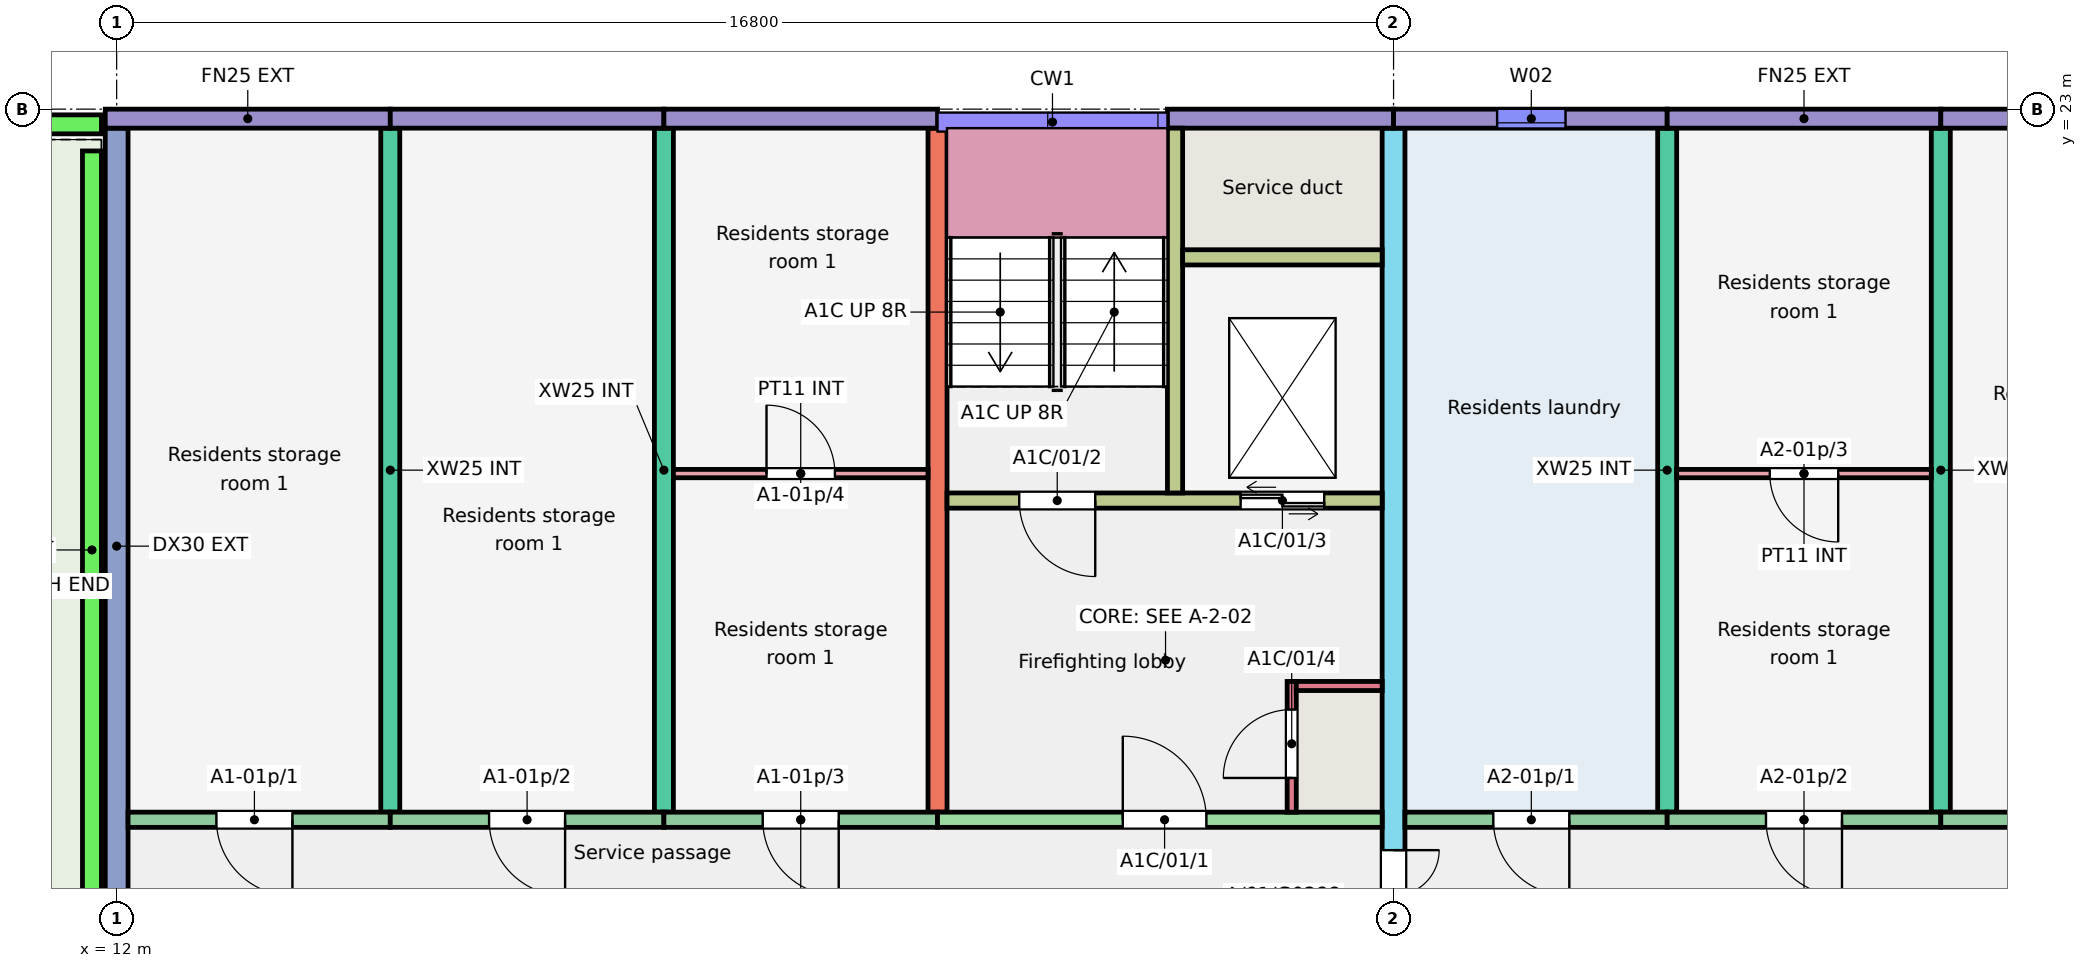
"""IFC4 building model, lengths in metres.
Left out: names, types, materials, properties, quantities, classifications, styles, units other than length and angle.
Written with IfcOpenShell. Run it as: python <this file> out.ifc"""

import sys

from ifc_helpers import new_model, si_unit, direction, frame, frame_2d, origin, place, context, subcontext, project, spatial, rectangle, extrude, element, fill, save


model = new_model("IFC4")
c1 = context("Model", 3, precision=1e-05, world=origin(), true_north=direction((0.0, 1.0)))
c2 = subcontext(c1, "Body", "Model", "MODEL_VIEW")
j1 = project(units=[si_unit("LENGTHUNIT", "METRE"), si_unit("PLANEANGLEUNIT", "RADIAN")], contexts=[c1])
p1 = place(None, origin())
s1 = spatial("IfcSite", under=j1, at=p1, CompositionType="ELEMENT")
p2 = place(p1, origin())
s2 = spatial("IfcBuilding", under=s1, at=p2, CompositionType="ELEMENT")
p3 = place(p2, frame((0.0, 0.0, 3.0)))
s3 = spatial("IfcBuildingStorey", under=s2, at=p3, CompositionType="ELEMENT", Elevation=3.0)
p4 = place(p3, frame((12.0, 11.75, 0.0), z_axis=(0.0, 0.0, 1.0), x_axis=(0.0, 1.0, 0.0)))
e1 = element("IfcWall", 1, at=p4, inside=s3, PredefinedType="SHEAR", context=c2, shape_type="SweptSolid", body=[
    extrude(rectangle(XDim=11.0, YDim=0.3, at=frame_2d((5.5, 0.0))), origin(), (0.0, 0.0, 1.0), 3.0),
])
for number, where, z_axis, x_axis in (
    (2, (15.6, 13.75, 0.0), (0.0, 0.0, 1.0), (0.0, 1.0, 0.0)),
    (3, (19.2, 13.75, 0.0), (0.0, 0.0, 1.0), (0.0, 1.0, 0.0)),
    (4, (22.8, 13.75, 0.0), (0.0, 0.0, 1.0), (0.0, 1.0, 0.0)),
):
    element("IfcWall", number, at=place(p3, frame(where, z_axis=z_axis, x_axis=x_axis)), inside=s3, PredefinedType="SHEAR", context=c2, shape_type="SweptSolid", body=[
        extrude(rectangle(XDim=9.0, YDim=0.25, at=frame_2d((4.5, 0.0))), origin(), (0.0, 0.0, 1.0), 3.0),
    ])
p5 = place(p3, frame((28.8, 11.75, 0.0), z_axis=(0.0, 0.0, 1.0), x_axis=(0.0, 1.0, 0.0)))
e5 = element("IfcWall", 5, at=p5, inside=s3, PredefinedType="SHEAR", context=c2, shape_type="SweptSolid", body=[
    extrude(rectangle(XDim=11.0, YDim=0.3, at=frame_2d((5.5, 0.0))), origin(), (0.0, 0.0, 1.0), 3.0),
])
p6 = place(p5, frame((0.3, 0.0, 0.0)))
e6 = element("IfcOpeningElement", 6, at=p6, cuts=e5, PredefinedType="OPENING", context=c2, shape_type="SweptSolid", body=[
    extrude(rectangle(XDim=1.2, YDim=2.1, at=frame_2d((0.6, 1.05))), frame((0.0, 0.16, 0.0), z_axis=(0.0, -1.0, 0.0), x_axis=(1.0, 0.0, 0.0)), (0.0, 0.0, 1.0), 0.32),
])
for number, where, z_axis, x_axis in (
    (7, (32.4, 13.75, 0.0), (0.0, 0.0, 1.0), (0.0, 1.0, 0.0)),
    (8, (36.0, 13.75, 0.0), (0.0, 0.0, 1.0), (0.0, 1.0, 0.0)),
):
    element("IfcWall", number, at=place(p3, frame(where, z_axis=z_axis, x_axis=x_axis)), inside=s3, PredefinedType="SHEAR", context=c2, shape_type="SweptSolid", body=[
        extrude(rectangle(XDim=9.0, YDim=0.25, at=frame_2d((4.5, 0.0))), origin(), (0.0, 0.0, 1.0), 3.0),
    ])
p7 = place(p3, frame((11.85, 22.875, 0.0), z_axis=(0.0, 0.0, 1.0), x_axis=(1.0, 0.0, 0.0)))
e9 = element("IfcWall", 9, at=p7, inside=s3, PredefinedType="SOLIDWALL", context=c2, shape_type="SweptSolid", body=[
    extrude(rectangle(XDim=3.75, YDim=0.25, at=frame_2d((1.875, 0.0))), origin(), (0.0, 0.0, 1.0), 3.0),
])
p8 = place(p3, frame((12.15, 13.65, 0.0), z_axis=(0.0, 0.0, 1.0), x_axis=(1.0, 0.0, 0.0)))
e10 = element("IfcWall", 10, at=p8, inside=s3, PredefinedType="SOLIDWALL", context=c2, shape_type="SweptSolid", body=[
    extrude(rectangle(XDim=3.45, YDim=0.2, at=frame_2d((1.725, 0.0))), origin(), (0.0, 0.0, 1.0), 3.0),
])
p9 = place(p8, frame((1.163, 0.0, 0.0)))
e11 = element("IfcOpeningElement", 11, at=p9, cuts=e10, PredefinedType="OPENING", context=c2, shape_type="SweptSolid", body=[
    extrude(rectangle(XDim=1.0, YDim=2.1, at=frame_2d((0.5, 1.05))), frame((0.0, 0.11, 0.0), z_axis=(0.0, -1.0, 0.0), x_axis=(1.0, 0.0, 0.0)), (0.0, 0.0, 1.0), 0.22),
])
p10 = place(p3, frame((15.6, 22.875, 0.0), z_axis=(0.0, 0.0, 1.0), x_axis=(1.0, 0.0, 0.0)))
e12 = element("IfcWall", 12, at=p10, inside=s3, PredefinedType="SOLIDWALL", context=c2, shape_type="SweptSolid", body=[
    extrude(rectangle(XDim=3.6, YDim=0.25, at=frame_2d((1.8, 0.0))), origin(), (0.0, 0.0, 1.0), 3.0),
])
p11 = place(p3, frame((15.6, 13.65, 0.0), z_axis=(0.0, 0.0, 1.0), x_axis=(1.0, 0.0, 0.0)))
e13 = element("IfcWall", 13, at=p11, inside=s3, PredefinedType="SOLIDWALL", context=c2, shape_type="SweptSolid", body=[
    extrude(rectangle(XDim=3.6, YDim=0.2, at=frame_2d((1.8, 0.0))), origin(), (0.0, 0.0, 1.0), 3.0),
])
p12 = place(p11, frame((1.3, 0.0, 0.0)))
e14 = element("IfcOpeningElement", 14, at=p12, cuts=e13, PredefinedType="OPENING", context=c2, shape_type="SweptSolid", body=[
    extrude(rectangle(XDim=1.0, YDim=2.1, at=frame_2d((0.5, 1.05))), frame((0.0, 0.11, 0.0), z_axis=(0.0, -1.0, 0.0), x_axis=(1.0, 0.0, 0.0)), (0.0, 0.0, 1.0), 0.22),
])
p13 = place(p3, frame((19.2, 22.875, 0.0), z_axis=(0.0, 0.0, 1.0), x_axis=(1.0, 0.0, 0.0)))
e15 = element("IfcWall", 15, at=p13, inside=s3, PredefinedType="SOLIDWALL", context=c2, shape_type="SweptSolid", body=[
    extrude(rectangle(XDim=3.6, YDim=0.25, at=frame_2d((1.8, 0.0))), origin(), (0.0, 0.0, 1.0), 3.0),
])
p14 = place(p3, frame((19.2, 13.65, 0.0), z_axis=(0.0, 0.0, 1.0), x_axis=(1.0, 0.0, 0.0)))
e16 = element("IfcWall", 16, at=p14, inside=s3, PredefinedType="SOLIDWALL", context=c2, shape_type="SweptSolid", body=[
    extrude(rectangle(XDim=3.6, YDim=0.2, at=frame_2d((1.8, 0.0))), origin(), (0.0, 0.0, 1.0), 3.0),
])
p15 = place(p14, frame((1.3, 0.0, 0.0)))
e17 = element("IfcOpeningElement", 17, at=p15, cuts=e16, PredefinedType="OPENING", context=c2, shape_type="SweptSolid", body=[
    extrude(rectangle(XDim=1.0, YDim=2.1, at=frame_2d((0.5, 1.05))), frame((0.0, 0.11, 0.0), z_axis=(0.0, -1.0, 0.0), x_axis=(1.0, 0.0, 0.0)), (0.0, 0.0, 1.0), 0.22),
])
p16 = place(p3, frame((25.825, 22.875, 0.0), z_axis=(0.0, 0.0, 1.0), x_axis=(1.0, 0.0, 0.0)))
e18 = element("IfcWall", 18, at=p16, inside=s3, PredefinedType="SOLIDWALL", context=c2, shape_type="SweptSolid", body=[
    extrude(rectangle(XDim=2.975, YDim=0.25, at=frame_2d((1.488, 0.0))), origin(), (0.0, 0.0, 1.0), 3.0),
])
p17 = place(p3, frame((22.8, 13.65, 0.0), z_axis=(0.0, 0.0, 1.0), x_axis=(1.0, 0.0, 0.0)))
e19 = element("IfcWall", 19, at=p17, inside=s3, PredefinedType="SHEAR", context=c2, shape_type="SweptSolid", body=[
    extrude(rectangle(XDim=5.85, YDim=0.2, at=frame_2d((2.925, 0.0))), origin(), (0.0, 0.0, 1.0), 3.0),
])
p18 = place(p17, frame((2.438, 0.0, 0.0)))
e20 = element("IfcOpeningElement", 20, at=p18, cuts=e19, PredefinedType="OPENING", context=c2, shape_type="SweptSolid", body=[
    extrude(rectangle(XDim=1.1, YDim=2.1, at=frame_2d((0.55, 1.05))), frame((0.0, 0.11, 0.0), z_axis=(0.0, -1.0, 0.0), x_axis=(1.0, 0.0, 0.0)), (0.0, 0.0, 1.0), 0.22),
])
p19 = place(p3, frame((22.925, 17.85, 0.0), z_axis=(0.0, 0.0, 1.0), x_axis=(1.0, 0.0, 0.0)))
e21 = element("IfcWall", 21, at=p19, inside=s3, PredefinedType="SHEAR", context=c2, shape_type="SweptSolid", body=[
    extrude(rectangle(XDim=5.725, YDim=0.2, at=frame_2d((2.862, 0.0))), origin(), (0.0, 0.0, 1.0), 3.0),
])
p20 = place(p19, frame((0.95, 0.0, 0.0)))
e22 = element("IfcOpeningElement", 22, at=p20, cuts=e21, PredefinedType="OPENING", context=c2, shape_type="SweptSolid", body=[
    extrude(rectangle(XDim=1.0, YDim=2.1, at=frame_2d((0.5, 1.05))), frame((0.0, 0.11, 0.0), z_axis=(0.0, -1.0, 0.0), x_axis=(1.0, 0.0, 0.0)), (0.0, 0.0, 1.0), 0.22),
])
p21 = place(p19, frame((3.863, 0.0, 0.0)))
e23 = element("IfcOpeningElement", 23, at=p21, cuts=e21, PredefinedType="OPENING", context=c2, shape_type="SweptSolid", body=[
    extrude(rectangle(XDim=1.1, YDim=2.1, at=frame_2d((0.55, 1.05))), frame((0.0, 0.11, 0.0), z_axis=(0.0, -1.0, 0.0), x_axis=(1.0, 0.0, 0.0)), (0.0, 0.0, 1.0), 0.22),
])
p22 = place(p3, frame((25.925, 17.95, 0.0), z_axis=(0.0, 0.0, 1.0), x_axis=(0.0, 1.0, 0.0)))
e24 = element("IfcWall", 24, at=p22, inside=s3, PredefinedType="SHEAR", context=c2, shape_type="SweptSolid", body=[
    extrude(rectangle(XDim=4.8, YDim=0.2, at=frame_2d((2.4, 0.0))), origin(), (0.0, 0.0, 1.0), 3.0),
])
p23 = place(p3, frame((26.025, 21.05, 0.0), z_axis=(0.0, 0.0, 1.0), x_axis=(1.0, 0.0, 0.0)))
e25 = element("IfcWall", 25, at=p23, inside=s3, PredefinedType="SHEAR", context=c2, shape_type="SweptSolid", body=[
    extrude(rectangle(XDim=2.625, YDim=0.2, at=frame_2d((1.312, 0.0))), origin(), (0.0, 0.0, 1.0), 3.0),
])
p24 = place(p3, frame((27.46, 13.75, 0.0), z_axis=(0.0, 0.0, 1.0), x_axis=(0.0, 1.0, 0.0)))
e26 = element("IfcWall", 26, at=p24, inside=s3, PredefinedType="SHEAR", context=c2, shape_type="SweptSolid", body=[
    extrude(rectangle(XDim=1.72, YDim=0.12, at=frame_2d((0.86, 0.0))), origin(), (0.0, 0.0, 1.0), 3.0),
])
p25 = place(p24, frame((0.45, 0.0, 0.0)))
e27 = element("IfcOpeningElement", 27, at=p25, cuts=e26, PredefinedType="OPENING", context=c2, shape_type="SweptSolid", body=[
    extrude(rectangle(XDim=0.9, YDim=2.1, at=frame_2d((0.45, 1.05))), frame((0.0, 0.07, 0.0), z_axis=(0.0, -1.0, 0.0), x_axis=(1.0, 0.0, 0.0)), (0.0, 0.0, 1.0), 0.14),
])
p26 = place(p3, frame((27.52, 15.41, 0.0), z_axis=(0.0, 0.0, 1.0), x_axis=(1.0, 0.0, 0.0)))
e28 = element("IfcWall", 28, at=p26, inside=s3, PredefinedType="SHEAR", context=c2, shape_type="SweptSolid", body=[
    extrude(rectangle(XDim=1.13, YDim=0.12, at=frame_2d((0.565, 0.0))), origin(), (0.0, 0.0, 1.0), 3.0),
])
p27 = place(p3, frame((28.8, 22.875, 0.0), z_axis=(0.0, 0.0, 1.0), x_axis=(1.0, 0.0, 0.0)))
e29 = element("IfcWall", 29, at=p27, inside=s3, PredefinedType="SOLIDWALL", context=c2, shape_type="SweptSolid", body=[
    extrude(rectangle(XDim=3.6, YDim=0.25, at=frame_2d((1.8, 0.0))), origin(), (0.0, 0.0, 1.0), 3.0),
])
p28 = place(p27, frame((1.363, 0.0, 1.8)))
e30 = element("IfcOpeningElement", 30, at=p28, cuts=e29, PredefinedType="OPENING", context=c2, shape_type="SweptSolid", body=[
    extrude(rectangle(XDim=0.9, YDim=0.6, at=frame_2d((0.45, 0.3))), frame((0.0, 0.135, 0.0), z_axis=(0.0, -1.0, 0.0), x_axis=(1.0, 0.0, 0.0)), (0.0, 0.0, 1.0), 0.27),
])
p29 = place(p3, frame((28.95, 13.65, 0.0), z_axis=(0.0, 0.0, 1.0), x_axis=(1.0, 0.0, 0.0)))
e31 = element("IfcWall", 31, at=p29, inside=s3, PredefinedType="SOLIDWALL", context=c2, shape_type="SweptSolid", body=[
    extrude(rectangle(XDim=3.45, YDim=0.2, at=frame_2d((1.725, 0.0))), origin(), (0.0, 0.0, 1.0), 3.0),
])
p30 = place(p29, frame((1.163, 0.0, 0.0)))
e32 = element("IfcOpeningElement", 32, at=p30, cuts=e31, PredefinedType="OPENING", context=c2, shape_type="SweptSolid", body=[
    extrude(rectangle(XDim=1.0, YDim=2.1, at=frame_2d((0.5, 1.05))), frame((0.0, 0.11, 0.0), z_axis=(0.0, -1.0, 0.0), x_axis=(1.0, 0.0, 0.0)), (0.0, 0.0, 1.0), 0.22),
])
p31 = place(p3, frame((32.4, 22.875, 0.0), z_axis=(0.0, 0.0, 1.0), x_axis=(1.0, 0.0, 0.0)))
e33 = element("IfcWall", 33, at=p31, inside=s3, PredefinedType="SOLIDWALL", context=c2, shape_type="SweptSolid", body=[
    extrude(rectangle(XDim=3.6, YDim=0.25, at=frame_2d((1.8, 0.0))), origin(), (0.0, 0.0, 1.0), 3.0),
])
p32 = place(p3, frame((32.4, 13.65, 0.0), z_axis=(0.0, 0.0, 1.0), x_axis=(1.0, 0.0, 0.0)))
e34 = element("IfcWall", 34, at=p32, inside=s3, PredefinedType="SOLIDWALL", context=c2, shape_type="SweptSolid", body=[
    extrude(rectangle(XDim=3.6, YDim=0.2, at=frame_2d((1.8, 0.0))), origin(), (0.0, 0.0, 1.0), 3.0),
])
p33 = place(p32, frame((1.3, 0.0, 0.0)))
e35 = element("IfcOpeningElement", 35, at=p33, cuts=e34, PredefinedType="OPENING", context=c2, shape_type="SweptSolid", body=[
    extrude(rectangle(XDim=1.0, YDim=2.1, at=frame_2d((0.5, 1.05))), frame((0.0, 0.11, 0.0), z_axis=(0.0, -1.0, 0.0), x_axis=(1.0, 0.0, 0.0)), (0.0, 0.0, 1.0), 0.22),
])
p34 = place(p3, frame((36.0, 22.875, 0.0), z_axis=(0.0, 0.0, 1.0), x_axis=(1.0, 0.0, 0.0)))
e36 = element("IfcWall", 36, at=p34, inside=s3, PredefinedType="SOLIDWALL", context=c2, shape_type="SweptSolid", body=[
    extrude(rectangle(XDim=3.6, YDim=0.25, at=frame_2d((1.8, 0.0))), origin(), (0.0, 0.0, 1.0), 3.0),
])
p35 = place(p3, frame((36.0, 13.65, 0.0), z_axis=(0.0, 0.0, 1.0), x_axis=(1.0, 0.0, 0.0)))
e37 = element("IfcWall", 37, at=p35, inside=s3, PredefinedType="SOLIDWALL", context=c2, shape_type="SweptSolid", body=[
    extrude(rectangle(XDim=3.6, YDim=0.2, at=frame_2d((1.8, 0.0))), origin(), (0.0, 0.0, 1.0), 3.0),
])
p36 = place(p35, frame((1.3, 0.0, 0.0)))
e38 = element("IfcOpeningElement", 38, at=p36, cuts=e37, PredefinedType="OPENING", context=c2, shape_type="SweptSolid", body=[
    extrude(rectangle(XDim=1.0, YDim=2.1, at=frame_2d((0.5, 1.05))), frame((0.0, 0.11, 0.0), z_axis=(0.0, -1.0, 0.0), x_axis=(1.0, 0.0, 0.0)), (0.0, 0.0, 1.0), 0.22),
])
p37 = place(p3, frame((6.05, 22.8, 0.0), z_axis=(0.0, 0.0, 1.0), x_axis=(1.0, 0.0, 0.0)))
e39 = element("IfcWall", 39, at=p37, inside=s3, PredefinedType="PARAPET", context=c2, shape_type="SweptSolid", body=[
    extrude(rectangle(XDim=5.75, YDim=0.25, at=frame_2d((2.875, 0.0))), origin(), (0.0, 0.0, 1.0), 1.1),
])
p38 = place(p3, frame((11.675, 11.95, 0.0), z_axis=(0.0, 0.0, 1.0), x_axis=(0.0, 1.0, 0.0)))
e40 = element("IfcWall", 40, at=p38, inside=s3, PredefinedType="PARAPET", context=c2, shape_type="SweptSolid", body=[
    extrude(rectangle(XDim=10.5, YDim=0.25, at=frame_2d((5.25, 0.0))), origin(), (0.0, 0.0, 1.0), 1.1),
])
p39 = place(p3, frame((19.325, 18.205, 0.0), z_axis=(0.0, 0.0, 1.0), x_axis=(1.0, 0.0, 0.0)))
e41 = element("IfcWall", 41, at=p39, inside=s3, PredefinedType="PARTITIONING", context=c2, shape_type="SweptSolid", body=[
    extrude(rectangle(XDim=3.35, YDim=0.11, at=frame_2d((1.675, 0.0))), origin(), (0.0, 0.0, 1.0), 2.8),
])
p40 = place(p39, frame((1.225, 0.0, 0.0)))
e42 = element("IfcOpeningElement", 42, at=p40, cuts=e41, PredefinedType="OPENING", context=c2, shape_type="SweptSolid", body=[
    extrude(rectangle(XDim=0.9, YDim=2.1, at=frame_2d((0.45, 1.05))), frame((0.0, 0.065, 0.0), z_axis=(0.0, -1.0, 0.0), x_axis=(1.0, 0.0, 0.0)), (0.0, 0.0, 1.0), 0.13),
])
p41 = place(p3, frame((32.525, 18.205, 0.0), z_axis=(0.0, 0.0, 1.0), x_axis=(1.0, 0.0, 0.0)))
e43 = element("IfcWall", 43, at=p41, inside=s3, PredefinedType="PARTITIONING", context=c2, shape_type="SweptSolid", body=[
    extrude(rectangle(XDim=3.35, YDim=0.11, at=frame_2d((1.675, 0.0))), origin(), (0.0, 0.0, 1.0), 2.8),
])
p42 = place(p41, frame((1.225, 0.0, 0.0)))
e44 = element("IfcOpeningElement", 44, at=p42, cuts=e43, PredefinedType="OPENING", context=c2, shape_type="SweptSolid", body=[
    extrude(rectangle(XDim=0.9, YDim=2.1, at=frame_2d((0.45, 1.05))), frame((0.0, 0.065, 0.0), z_axis=(0.0, -1.0, 0.0), x_axis=(1.0, 0.0, 0.0)), (0.0, 0.0, 1.0), 0.13),
])
p43 = place(p28, origin())
e45 = element("IfcWindow", 45, at=p43, inside=s3, PartitioningType="SINGLE_PANEL", PredefinedType="WINDOW", context=c2, shape_type="SweptSolid", body=[
    extrude(rectangle(XDim=0.9, YDim=0.6, at=frame_2d((0.45, 0.3))), frame((0.0, -0.025, 0.0), z_axis=(0.0, -1.0, 0.0), x_axis=(1.0, 0.0, 0.0)), (0.0, 0.0, 1.0), 0.06),
])
fill(e30, e45)
p44 = place(p9, origin())
e46 = element("IfcDoor", 46, at=p44, inside=s3, OperationType="SINGLE_SWING_RIGHT", PredefinedType="DOOR", context=c2, shape_type="SweptSolid", body=[
    extrude(rectangle(XDim=1.0, YDim=2.1, at=frame_2d((0.5, 1.05))), frame((0.0, 0.025, 0.0), z_axis=(0.0, -1.0, 0.0), x_axis=(1.0, 0.0, 0.0)), (0.0, 0.0, 1.0), 0.05),
])
fill(e11, e46)
p45 = place(p12, origin())
e47 = element("IfcDoor", 47, at=p45, inside=s3, OperationType="SINGLE_SWING_RIGHT", PredefinedType="DOOR", context=c2, shape_type="SweptSolid", body=[
    extrude(rectangle(XDim=1.0, YDim=2.1, at=frame_2d((0.5, 1.05))), frame((0.0, 0.025, 0.0), z_axis=(0.0, -1.0, 0.0), x_axis=(1.0, 0.0, 0.0)), (0.0, 0.0, 1.0), 0.05),
])
fill(e14, e47)
p46 = place(p15, origin())
e48 = element("IfcDoor", 48, at=p46, inside=s3, OperationType="SINGLE_SWING_RIGHT", PredefinedType="DOOR", context=c2, shape_type="SweptSolid", body=[
    extrude(rectangle(XDim=1.0, YDim=2.1, at=frame_2d((0.5, 1.05))), frame((0.0, 0.025, 0.0), z_axis=(0.0, -1.0, 0.0), x_axis=(1.0, 0.0, 0.0)), (0.0, 0.0, 1.0), 0.05),
])
fill(e17, e48)
p47 = place(p40, origin())
e49 = element("IfcDoor", 49, at=p47, inside=s3, OperationType="SINGLE_SWING_LEFT", PredefinedType="DOOR", context=c2, shape_type="SweptSolid", body=[
    extrude(rectangle(XDim=0.9, YDim=2.1, at=frame_2d((0.45, 1.05))), frame((0.0, 0.025, 0.0), z_axis=(0.0, -1.0, 0.0), x_axis=(1.0, 0.0, 0.0)), (0.0, 0.0, 1.0), 0.05),
])
fill(e42, e49)
p48 = place(p30, origin())
e50 = element("IfcDoor", 50, at=p48, inside=s3, OperationType="SINGLE_SWING_RIGHT", PredefinedType="DOOR", context=c2, shape_type="SweptSolid", body=[
    extrude(rectangle(XDim=1.0, YDim=2.1, at=frame_2d((0.5, 1.05))), frame((0.0, 0.025, 0.0), z_axis=(0.0, -1.0, 0.0), x_axis=(1.0, 0.0, 0.0)), (0.0, 0.0, 1.0), 0.05),
])
fill(e32, e50)
p49 = place(p33, origin())
e51 = element("IfcDoor", 51, at=p49, inside=s3, OperationType="SINGLE_SWING_RIGHT", PredefinedType="DOOR", context=c2, shape_type="SweptSolid", body=[
    extrude(rectangle(XDim=1.0, YDim=2.1, at=frame_2d((0.5, 1.05))), frame((0.0, 0.025, 0.0), z_axis=(0.0, -1.0, 0.0), x_axis=(1.0, 0.0, 0.0)), (0.0, 0.0, 1.0), 0.05),
])
fill(e35, e51)
p50 = place(p42, origin())
e52 = element("IfcDoor", 52, at=p50, inside=s3, OperationType="SINGLE_SWING_RIGHT", PredefinedType="DOOR", context=c2, shape_type="SweptSolid", body=[
    extrude(rectangle(XDim=0.9, YDim=2.1, at=frame_2d((0.45, 1.05))), frame((0.0, 0.025, 0.0), z_axis=(0.0, -1.0, 0.0), x_axis=(1.0, 0.0, 0.0)), (0.0, 0.0, 1.0), 0.05),
])
fill(e44, e52)
p51 = place(p18, origin())
e53 = element("IfcDoor", 53, at=p51, inside=s3, OperationType="SINGLE_SWING_LEFT", PredefinedType="DOOR", context=c2, shape_type="SweptSolid", body=[
    extrude(rectangle(XDim=1.1, YDim=2.1, at=frame_2d((0.55, 1.05))), frame((0.0, 0.025, 0.0), z_axis=(0.0, -1.0, 0.0), x_axis=(1.0, 0.0, 0.0)), (0.0, 0.0, 1.0), 0.05),
])
fill(e20, e53)
p52 = place(p20, origin())
e54 = element("IfcDoor", 54, at=p52, inside=s3, OperationType="SINGLE_SWING_RIGHT", PredefinedType="DOOR", context=c2, shape_type="SweptSolid", body=[
    extrude(rectangle(XDim=1.0, YDim=2.1, at=frame_2d((0.5, 1.05))), frame((0.0, 0.025, 0.0), z_axis=(0.0, -1.0, 0.0), x_axis=(1.0, 0.0, 0.0)), (0.0, 0.0, 1.0), 0.05),
])
fill(e22, e54)
p53 = place(p21, origin())
e55 = element("IfcDoor", 55, at=p53, inside=s3, OperationType="DOUBLE_DOOR_SLIDING", PredefinedType="DOOR", context=c2, shape_type="SweptSolid", body=[
    extrude(rectangle(XDim=1.1, YDim=2.1, at=frame_2d((0.55, 1.05))), frame((0.0, 0.025, 0.0), z_axis=(0.0, -1.0, 0.0), x_axis=(1.0, 0.0, 0.0)), (0.0, 0.0, 1.0), 0.05),
])
fill(e23, e55)
p54 = place(p25, origin())
e56 = element("IfcDoor", 56, at=p54, inside=s3, OperationType="SINGLE_SWING_LEFT", PredefinedType="DOOR", context=c2, shape_type="SweptSolid", body=[
    extrude(rectangle(XDim=0.9, YDim=2.1, at=frame_2d((0.45, 1.05))), frame((0.0, 0.025, 0.0), z_axis=(0.0, -1.0, 0.0), x_axis=(1.0, 0.0, 0.0)), (0.0, 0.0, 1.0), 0.05),
])
fill(e27, e56)
p55 = place(p6, origin())
e57 = element("IfcDoor", 57, at=p55, inside=s3, OperationType="DOUBLE_DOOR_SINGLE_SWING", PredefinedType="DOOR", context=c2, shape_type="SweptSolid", body=[
    extrude(rectangle(XDim=1.2, YDim=2.1, at=frame_2d((0.6, 1.05))), frame((0.0, 0.025, 0.0), z_axis=(0.0, -1.0, 0.0), x_axis=(1.0, 0.0, 0.0)), (0.0, 0.0, 1.0), 0.05),
])
fill(e6, e57)
save(model, sys.argv[1])
